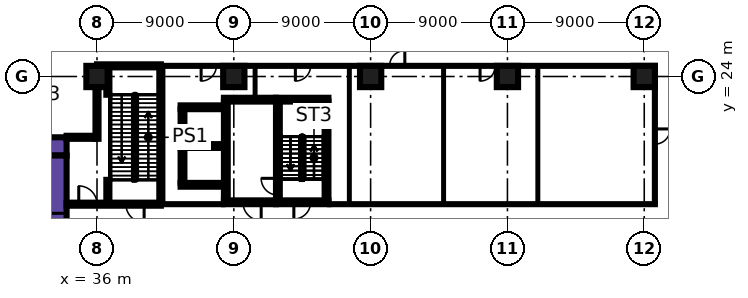
"""IFC4 building model, lengths in metres.
Left out: names, types, materials, properties, quantities, classifications, styles, units other than length and angle.
Written with IfcOpenShell. Run it as: python <this file> out.ifc"""

import sys

from ifc_helpers import new_model, si_unit, direction, frame, frame_2d, origin, origin_2d, place, context, subcontext, project, spatial, rectangle, extrude, element, fill, save


model = new_model("IFC4")
c1 = context("Model", 3, precision=1e-05, world=origin(), true_north=direction((0.0, 1.0)))
c2 = subcontext(c1, "Body", "Model", "MODEL_VIEW")
j1 = project(units=[si_unit("LENGTHUNIT", "METRE"), si_unit("PLANEANGLEUNIT", "RADIAN")], contexts=[c1])
p1 = place(None, origin())
s1 = spatial("IfcSite", under=j1, at=p1, CompositionType="ELEMENT")
p2 = place(p1, origin())
s2 = spatial("IfcBuilding", under=s1, at=p2, CompositionType="ELEMENT")
p3 = place(p2, origin())
s3 = spatial("IfcBuildingStorey", under=s2, at=p3, CompositionType="ELEMENT", Elevation=0.0)
for number, where, z_axis, x_axis in (
    (1, (36.0, 24.0, 0.0), (0.0, 0.0, 1.0), (1.0, 0.0, 0.0)),
    (2, (45.0, 24.0, 0.0), (0.0, 0.0, 1.0), (1.0, 0.0, 0.0)),
    (3, (54.0, 24.0, 0.0), (0.0, 0.0, 1.0), (1.0, 0.0, 0.0)),
    (4, (63.0, 24.0, 0.0), (0.0, 0.0, 1.0), (1.0, 0.0, 0.0)),
    (5, (72.0, 24.0, 0.0), (0.0, 0.0, 1.0), (1.0, 0.0, 0.0)),
):
    element("IfcColumn", number, at=place(p3, frame(where, z_axis=z_axis, x_axis=x_axis)), inside=s3, PredefinedType="COLUMN", context=c2, shape_type="SweptSolid", body=[
        extrude(rectangle(XDim=1.4, YDim=1.4, at=origin_2d()), origin(), (0.0, 0.0, 1.0), 7.2),
    ])
p4 = place(p3, frame((9.0, 19.4, 0.0), z_axis=(0.0, 0.0, 1.0), x_axis=(1.0, 0.0, 0.0)))
e6 = element("IfcWall", 6, at=p4, inside=s3, PredefinedType="SHEAR", context=c2, shape_type="SweptSolid", body=[
    extrude(rectangle(XDim=25.0, YDim=1.2, at=frame_2d((12.5, 0.0))), origin(), (0.0, 0.0, 1.0), 7.2),
])
p5 = place(p4, frame((19.1, 0.0, 0.0)))
e7 = element("IfcOpeningElement", 7, at=p5, cuts=e6, PredefinedType="OPENING", context=c2, shape_type="SweptSolid", body=[
    extrude(rectangle(XDim=1.8, YDim=2.4, at=frame_2d((0.9, 1.2))), frame((0.0, 0.61, 0.0), z_axis=(0.0, -1.0, 0.0), x_axis=(1.0, 0.0, 0.0)), (0.0, 0.0, 1.0), 1.22),
])
p6 = place(p3, frame((33.4, 8.2, 0.0), z_axis=(0.0, 0.0, 1.0), x_axis=(0.0, 1.0, 0.0)))
e8 = element("IfcWall", 8, at=p6, inside=s3, PredefinedType="SHEAR", context=c2, shape_type="SweptSolid", body=[
    extrude(rectangle(XDim=10.6, YDim=1.2, at=frame_2d((5.3, 0.0))), origin(), (0.0, 0.0, 1.0), 7.2),
])
p7 = place(p6, frame((5.0, 0.0, 0.0)))
e9 = element("IfcOpeningElement", 9, at=p7, cuts=e8, PredefinedType="OPENING", context=c2, shape_type="SweptSolid", body=[
    extrude(rectangle(XDim=1.8, YDim=2.4, at=frame_2d((0.9, 1.2))), frame((0.0, 0.61, 0.0), z_axis=(0.0, -1.0, 0.0), x_axis=(1.0, 0.0, 0.0)), (0.0, 0.0, 1.0), 1.22),
])
p8 = place(p3, frame((47.775, 15.725, 0.0), z_axis=(0.0, 0.0, 1.0), x_axis=(1.0, 0.0, 0.0)))
e10 = element("IfcWall", 10, at=p8, inside=s3, PredefinedType="SHEAR", context=c2, shape_type="SweptSolid", body=[
    extrude(rectangle(XDim=3.45, YDim=0.25, at=frame_2d((1.725, 0.0))), origin(), (0.0, 0.0, 1.0), 7.2),
])
p9 = place(p8, frame((1.175, 0.0, 0.0)))
e11 = element("IfcOpeningElement", 11, at=p9, cuts=e10, PredefinedType="OPENING", context=c2, shape_type="SweptSolid", body=[
    extrude(rectangle(XDim=1.1, YDim=2.2, at=frame_2d((0.55, 1.1))), frame((0.0, 0.135, 0.0), z_axis=(0.0, -1.0, 0.0), x_axis=(1.0, 0.0, 0.0)), (0.0, 0.0, 1.0), 0.27),
])
p10 = place(p3, frame((47.775, 22.475, 0.0), z_axis=(0.0, 0.0, 1.0), x_axis=(1.0, 0.0, 0.0)))
e12 = element("IfcWall", 12, at=p10, inside=s3, PredefinedType="SHEAR", context=c2, shape_type="SweptSolid", body=[
    extrude(rectangle(XDim=3.45, YDim=0.25, at=frame_2d((1.725, 0.0))), origin(), (0.0, 0.0, 1.0), 7.2),
])
p11 = place(p3, frame((47.9, 15.85, 0.0), z_axis=(0.0, 0.0, 1.0), x_axis=(0.0, 1.0, 0.0)))
e13 = element("IfcWall", 13, at=p11, inside=s3, PredefinedType="SHEAR", context=c2, shape_type="SweptSolid", body=[
    extrude(rectangle(XDim=6.5, YDim=0.25, at=frame_2d((3.25, 0.0))), origin(), (0.0, 0.0, 1.0), 7.2),
])
p12 = place(p11, frame((0.35, 0.0, 0.0)))
e14 = element("IfcOpeningElement", 14, at=p12, cuts=e13, PredefinedType="OPENING", context=c2, shape_type="SweptSolid", body=[
    extrude(rectangle(XDim=1.1, YDim=2.2, at=frame_2d((0.55, 1.1))), frame((0.0, 0.135, 0.0), z_axis=(0.0, -1.0, 0.0), x_axis=(1.0, 0.0, 0.0)), (0.0, 0.0, 1.0), 0.27),
])
p13 = place(p3, frame((51.1, 15.85, 0.0), z_axis=(0.0, 0.0, 1.0), x_axis=(0.0, 1.0, 0.0)))
e15 = element("IfcWall", 15, at=p13, inside=s3, PredefinedType="SHEAR", context=c2, shape_type="SweptSolid", body=[
    extrude(rectangle(XDim=6.5, YDim=0.25, at=frame_2d((3.25, 0.0))), origin(), (0.0, 0.0, 1.0), 7.2),
])
p14 = place(p3, frame((44.35, 15.725, 0.0), z_axis=(0.0, 0.0, 1.0), x_axis=(1.0, 0.0, 0.0)))
e16 = element("IfcWall", 16, at=p14, inside=s3, PredefinedType="SHEAR", context=c2, shape_type="SweptSolid", body=[
    extrude(rectangle(XDim=3.425, YDim=0.25, at=frame_2d((1.712, 0.0))), origin(), (0.0, 0.0, 1.0), 7.2),
])
p15 = place(p14, frame((1.25, 0.0, 0.0)))
e17 = element("IfcOpeningElement", 17, at=p15, cuts=e16, PredefinedType="OPENING", context=c2, shape_type="SweptSolid", body=[
    extrude(rectangle(XDim=1.2, YDim=2.2, at=frame_2d((0.6, 1.1))), frame((0.0, 0.135, 0.0), z_axis=(0.0, -1.0, 0.0), x_axis=(1.0, 0.0, 0.0)), (0.0, 0.0, 1.0), 0.27),
])
p16 = place(p3, frame((44.35, 22.475, 0.0), z_axis=(0.0, 0.0, 1.0), x_axis=(1.0, 0.0, 0.0)))
e18 = element("IfcWall", 18, at=p16, inside=s3, PredefinedType="SHEAR", context=c2, shape_type="SweptSolid", body=[
    extrude(rectangle(XDim=3.425, YDim=0.25, at=frame_2d((1.712, 0.0))), origin(), (0.0, 0.0, 1.0), 7.2),
])
p17 = place(p3, frame((44.475, 15.85, 0.0), z_axis=(0.0, 0.0, 1.0), x_axis=(0.0, 1.0, 0.0)))
e19 = element("IfcWall", 19, at=p17, inside=s3, PredefinedType="SHEAR", context=c2, shape_type="SweptSolid", body=[
    extrude(rectangle(XDim=6.5, YDim=0.25, at=frame_2d((3.25, 0.0))), origin(), (0.0, 0.0, 1.0), 7.2),
])
p18 = place(p17, frame((1.75, 0.0, 0.0)))
e20 = element("IfcOpeningElement", 20, at=p18, cuts=e19, PredefinedType="OPENING", context=c2, shape_type="SweptSolid", body=[
    extrude(rectangle(XDim=1.1, YDim=2.2, at=frame_2d((0.55, 1.1))), frame((0.0, 0.135, 0.0), z_axis=(0.0, -1.0, 0.0), x_axis=(1.0, 0.0, 0.0)), (0.0, 0.0, 1.0), 0.27),
])
p19 = place(p17, frame((4.3, 0.0, 0.0)))
e21 = element("IfcOpeningElement", 21, at=p19, cuts=e19, PredefinedType="OPENING", context=c2, shape_type="SweptSolid", body=[
    extrude(rectangle(XDim=1.1, YDim=2.2, at=frame_2d((0.55, 1.1))), frame((0.0, 0.135, 0.0), z_axis=(0.0, -1.0, 0.0), x_axis=(1.0, 0.0, 0.0)), (0.0, 0.0, 1.0), 0.27),
])
for number, where, z_axis, x_axis in (
    (22, (41.5, 16.875, 0.0), (0.0, 0.0, 1.0), (1.0, 0.0, 0.0)),
    (23, (41.5, 19.425, 0.0), (0.0, 0.0, 1.0), (1.0, 0.0, 0.0)),
    (24, (41.5, 21.975, 0.0), (0.0, 0.0, 1.0), (1.0, 0.0, 0.0)),
):
    element("IfcWall", number, at=place(p3, frame(where, z_axis=z_axis, x_axis=x_axis)), inside=s3, PredefinedType="SHEAR", context=c2, shape_type="SweptSolid", body=[
        extrude(rectangle(XDim=2.85, YDim=0.25, at=frame_2d((1.425, 0.0))), origin(), (0.0, 0.0, 1.0), 7.2),
    ])
for number, where, z_axis, x_axis in (
    (25, (41.625, 17.0, 0.0), (0.0, 0.0, 1.0), (0.0, 1.0, 0.0)),
    (26, (41.625, 19.55, 0.0), (0.0, 0.0, 1.0), (0.0, 1.0, 0.0)),
):
    element("IfcWall", number, at=place(p3, frame(where, z_axis=z_axis, x_axis=x_axis)), inside=s3, PredefinedType="SHEAR", context=c2, shape_type="SweptSolid", body=[
        extrude(rectangle(XDim=2.3, YDim=0.25, at=frame_2d((1.15, 0.0))), origin(), (0.0, 0.0, 1.0), 7.2),
    ])
p20 = place(p3, frame((34.0, 15.6, 0.0), z_axis=(0.0, 0.0, 1.0), x_axis=(1.0, 0.0, 0.0)))
e27 = element("IfcWall", 27, at=p20, inside=s3, PredefinedType="SOLIDWALL", context=c2, shape_type="SweptSolid", body=[
    extrude(rectangle(XDim=6.2, YDim=0.2, at=frame_2d((3.1, 0.0))), origin(), (0.0, 0.0, 1.0), 6.8),
])
p21 = place(p20, frame((3.9, 0.0, 0.0)))
e28 = element("IfcOpeningElement", 28, at=p21, cuts=e27, PredefinedType="OPENING", context=c2, shape_type="SweptSolid", body=[
    extrude(rectangle(XDim=1.2, YDim=2.1, at=frame_2d((0.6, 1.05))), frame((0.0, 0.11, 0.0), z_axis=(0.0, -1.0, 0.0), x_axis=(1.0, 0.0, 0.0)), (0.0, 0.0, 1.0), 0.22),
])
p22 = place(p20, frame((0.8, 0.0, 0.0)))
e29 = element("IfcOpeningElement", 29, at=p22, cuts=e27, PredefinedType="OPENING", context=c2, shape_type="SweptSolid", body=[
    extrude(rectangle(XDim=1.2, YDim=2.1, at=frame_2d((0.6, 1.05))), frame((0.0, 0.11, 0.0), z_axis=(0.0, -1.0, 0.0), x_axis=(1.0, 0.0, 0.0)), (0.0, 0.0, 1.0), 0.22),
])
p23 = place(p3, frame((34.0, 20.0, 0.0), z_axis=(0.0, 0.0, 1.0), x_axis=(1.0, 0.0, 0.0)))
e30 = element("IfcWall", 30, at=p23, inside=s3, PredefinedType="SOLIDWALL", context=c2, shape_type="SweptSolid", body=[
    extrude(rectangle(XDim=1.9, YDim=0.2, at=frame_2d((0.95, 0.0))), origin(), (0.0, 0.0, 1.0), 6.8),
])
p24 = place(p3, frame((36.0, 19.9, 0.0), z_axis=(0.0, 0.0, 1.0), x_axis=(0.0, 1.0, 0.0)))
e31 = element("IfcWall", 31, at=p24, inside=s3, PredefinedType="SOLIDWALL", context=c2, shape_type="SweptSolid", body=[
    extrude(rectangle(XDim=4.1, YDim=0.2, at=frame_2d((2.05, 0.0))), origin(), (0.0, 0.0, 1.0), 6.8),
])
p25 = place(p3, frame((36.0, 24.7, 0.0), z_axis=(0.0, 0.0, 1.0), x_axis=(1.0, 0.0, 0.0)))
e32 = element("IfcWall", 32, at=p25, inside=s3, PredefinedType="SOLIDWALL", context=c2, shape_type="SweptSolid", body=[
    extrude(rectangle(XDim=4.2, YDim=0.2, at=frame_2d((2.1, 0.0))), origin(), (0.0, 0.0, 1.0), 6.8),
])
p26 = place(p3, frame((40.2, 15.6, 0.0), z_axis=(0.0, 0.0, 1.0), x_axis=(1.0, 0.0, 0.0)))
e33 = element("IfcWall", 33, at=p26, inside=s3, PredefinedType="PARTITIONING", context=c2, shape_type="SweptSolid", body=[
    extrude(rectangle(XDim=4.15, YDim=0.2, at=frame_2d((2.075, 0.0))), origin(), (0.0, 0.0, 1.0), 6.8),
])
p27 = place(p3, frame((40.2, 15.7, 0.0), z_axis=(0.0, 0.0, 1.0), x_axis=(0.0, 1.0, 0.0)))
e34 = element("IfcWall", 34, at=p27, inside=s3, PredefinedType="SOLIDWALL", context=c2, shape_type="SweptSolid", body=[
    extrude(rectangle(XDim=8.9, YDim=0.2, at=frame_2d((4.45, 0.0))), origin(), (0.0, 0.0, 1.0), 6.8),
])
p28 = place(p3, frame((40.2, 24.7, 0.0), z_axis=(0.0, 0.0, 1.0), x_axis=(1.0, 0.0, 0.0)))
e35 = element("IfcWall", 35, at=p28, inside=s3, PredefinedType="PARTITIONING", context=c2, shape_type="SweptSolid", body=[
    extrude(rectangle(XDim=32.6, YDim=0.2, at=frame_2d((16.3, 0.0))), origin(), (0.0, 0.0, 1.0), 6.8),
])
p29 = place(p28, frame((2.65, 0.0, 0.0)))
e36 = element("IfcOpeningElement", 36, at=p29, cuts=e35, PredefinedType="OPENING", context=c2, shape_type="SweptSolid", body=[
    extrude(rectangle(XDim=1.0, YDim=2.1, at=frame_2d((0.5, 1.05))), frame((0.0, 0.11, 0.0), z_axis=(0.0, -1.0, 0.0), x_axis=(1.0, 0.0, 0.0)), (0.0, 0.0, 1.0), 0.22),
])
p30 = place(p28, frame((8.85, 0.0, 0.0)))
e37 = element("IfcOpeningElement", 37, at=p30, cuts=e35, PredefinedType="OPENING", context=c2, shape_type="SweptSolid", body=[
    extrude(rectangle(XDim=1.0, YDim=2.1, at=frame_2d((0.5, 1.05))), frame((0.0, 0.11, 0.0), z_axis=(0.0, -1.0, 0.0), x_axis=(1.0, 0.0, 0.0)), (0.0, 0.0, 1.0), 0.22),
])
p31 = place(p28, frame((15.05, 0.0, 0.0)))
e38 = element("IfcOpeningElement", 38, at=p31, cuts=e35, PredefinedType="OPENING", context=c2, shape_type="SweptSolid", body=[
    extrude(rectangle(XDim=1.0, YDim=2.1, at=frame_2d((0.5, 1.05))), frame((0.0, 0.11, 0.0), z_axis=(0.0, -1.0, 0.0), x_axis=(1.0, 0.0, 0.0)), (0.0, 0.0, 1.0), 0.22),
])
p32 = place(p28, frame((21.0, 0.0, 0.0)))
e39 = element("IfcOpeningElement", 39, at=p32, cuts=e35, PredefinedType="OPENING", context=c2, shape_type="SweptSolid", body=[
    extrude(rectangle(XDim=1.0, YDim=2.1, at=frame_2d((0.5, 1.05))), frame((0.0, 0.11, 0.0), z_axis=(0.0, -1.0, 0.0), x_axis=(1.0, 0.0, 0.0)), (0.0, 0.0, 1.0), 0.22),
])
p33 = place(p3, frame((46.4, 22.6, 0.0), z_axis=(0.0, 0.0, 1.0), x_axis=(0.0, 1.0, 0.0)))
e40 = element("IfcWall", 40, at=p33, inside=s3, PredefinedType="PARTITIONING", context=c2, shape_type="SweptSolid", body=[
    extrude(rectangle(XDim=2.0, YDim=0.125, at=frame_2d((1.0, 0.0))), origin(), (0.0, 0.0, 1.0), 6.8),
])
p34 = place(p3, frame((51.225, 15.6, 0.0), z_axis=(0.0, 0.0, 1.0), x_axis=(1.0, 0.0, 0.0)))
e41 = element("IfcWall", 41, at=p34, inside=s3, PredefinedType="PARTITIONING", context=c2, shape_type="SweptSolid", body=[
    extrude(rectangle(XDim=21.575, YDim=0.2, at=frame_2d((10.788, 0.0))), origin(), (0.0, 0.0, 1.0), 6.8),
])
for number, where, z_axis, x_axis in (
    (42, (52.6, 15.7, 0.0), (0.0, 0.0, 1.0), (0.0, 1.0, 0.0)),
    (43, (58.8, 15.7, 0.0), (0.0, 0.0, 1.0), (0.0, 1.0, 0.0)),
    (44, (65.0, 15.7, 0.0), (0.0, 0.0, 1.0), (0.0, 1.0, 0.0)),
):
    element("IfcWall", number, at=place(p3, frame(where, z_axis=z_axis, x_axis=x_axis)), inside=s3, PredefinedType="PARTITIONING", context=c2, shape_type="SweptSolid", body=[
        extrude(rectangle(XDim=8.9, YDim=0.125, at=frame_2d((4.45, 0.0))), origin(), (0.0, 0.0, 1.0), 6.8),
    ])
p35 = place(p3, frame((72.7, 15.7, 0.0), z_axis=(0.0, 0.0, 1.0), x_axis=(0.0, 1.0, 0.0)))
e45 = element("IfcWall", 45, at=p35, inside=s3, PredefinedType="PARTITIONING", context=c2, shape_type="SweptSolid", body=[
    extrude(rectangle(XDim=8.9, YDim=0.2, at=frame_2d((4.45, 0.0))), origin(), (0.0, 0.0, 1.0), 6.8),
])
p36 = place(p35, frame((3.85, 0.0, 0.0)))
e46 = element("IfcOpeningElement", 46, at=p36, cuts=e45, PredefinedType="OPENING", context=c2, shape_type="SweptSolid", body=[
    extrude(rectangle(XDim=1.0, YDim=2.1, at=frame_2d((0.5, 1.05))), frame((0.0, 0.11, 0.0), z_axis=(0.0, -1.0, 0.0), x_axis=(1.0, 0.0, 0.0)), (0.0, 0.0, 1.0), 0.22),
])
p37 = place(p3, frame((36.715, 22.8, 0.0), z_axis=(0.0, 0.0, 1.0), x_axis=(0.0, 1.0, 0.0)))
e47 = element("IfcWall", 47, at=p37, inside=s3, PredefinedType="SOLIDWALL", context=c2, shape_type="SweptSolid", body=[
    extrude(rectangle(XDim=1.8, YDim=0.2, at=frame_2d((0.9, 0.0))), origin(), (0.0, 0.0, 1.0), 6.8),
])
p38 = place(p3, frame((36.715, 15.7, 0.0), z_axis=(0.0, 0.0, 1.0), x_axis=(0.0, 1.0, 0.0)))
e48 = element("IfcWall", 48, at=p38, inside=s3, PredefinedType="SOLIDWALL", context=c2, shape_type="SweptSolid", body=[
    extrude(rectangle(XDim=1.5, YDim=0.2, at=frame_2d((0.75, 0.0))), origin(), (0.0, 0.0, 1.0), 6.8),
])
p39 = place(p7, origin())
e49 = element("IfcDoor", 49, at=p39, inside=s3, OperationType="DOUBLE_DOOR_SINGLE_SWING", PredefinedType="DOOR", context=c2, shape_type="SweptSolid", body=[
    extrude(rectangle(XDim=1.8, YDim=2.4, at=frame_2d((0.9, 1.2))), frame((0.0, 0.025, 0.0), z_axis=(0.0, -1.0, 0.0), x_axis=(1.0, 0.0, 0.0)), (0.0, 0.0, 1.0), 0.05),
])
fill(e9, e49)
p40 = place(p9, frame((1.1, 0.0, 0.0), z_axis=(0.0, 0.0, 1.0), x_axis=(-1.0, 0.0, 0.0)))
e50 = element("IfcDoor", 50, at=p40, inside=s3, OperationType="SINGLE_SWING_LEFT", PredefinedType="DOOR", context=c2, shape_type="SweptSolid", body=[
    extrude(rectangle(XDim=1.1, YDim=2.2, at=frame_2d((0.55, 1.1))), frame((0.0, 0.025, 0.0), z_axis=(0.0, -1.0, 0.0), x_axis=(1.0, 0.0, 0.0)), (0.0, 0.0, 1.0), 0.05),
])
fill(e11, e50)
p41 = place(p15, origin())
e51 = element("IfcDoor", 51, at=p41, inside=s3, OperationType="SINGLE_SWING_RIGHT", PredefinedType="DOOR", context=c2, shape_type="SweptSolid", body=[
    extrude(rectangle(XDim=1.2, YDim=2.2, at=frame_2d((0.6, 1.1))), frame((0.0, 0.025, 0.0), z_axis=(0.0, -1.0, 0.0), x_axis=(1.0, 0.0, 0.0)), (0.0, 0.0, 1.0), 0.05),
])
fill(e17, e51)
p42 = place(p12, frame((1.1, 0.0, 0.0), z_axis=(0.0, 0.0, 1.0), x_axis=(-1.0, 0.0, 0.0)))
e52 = element("IfcDoor", 52, at=p42, inside=s3, OperationType="SINGLE_SWING_RIGHT", PredefinedType="DOOR", context=c2, shape_type="SweptSolid", body=[
    extrude(rectangle(XDim=1.1, YDim=2.2, at=frame_2d((0.55, 1.1))), frame((0.0, 0.025, 0.0), z_axis=(0.0, -1.0, 0.0), x_axis=(1.0, 0.0, 0.0)), (0.0, 0.0, 1.0), 0.05),
])
fill(e14, e52)
p43 = place(p18, origin())
e53 = element("IfcDoor", 53, at=p43, inside=s3, OperationType="DOUBLE_DOOR_SLIDING", PredefinedType="DOOR", context=c2, shape_type="SweptSolid", body=[
    extrude(rectangle(XDim=1.1, YDim=2.2, at=frame_2d((0.55, 1.1))), frame((0.0, 0.025, 0.0), z_axis=(0.0, -1.0, 0.0), x_axis=(1.0, 0.0, 0.0)), (0.0, 0.0, 1.0), 0.05),
])
fill(e20, e53)
p44 = place(p19, origin())
e54 = element("IfcDoor", 54, at=p44, inside=s3, OperationType="DOUBLE_DOOR_SLIDING", PredefinedType="DOOR", context=c2, shape_type="SweptSolid", body=[
    extrude(rectangle(XDim=1.1, YDim=2.2, at=frame_2d((0.55, 1.1))), frame((0.0, 0.025, 0.0), z_axis=(0.0, -1.0, 0.0), x_axis=(1.0, 0.0, 0.0)), (0.0, 0.0, 1.0), 0.05),
])
fill(e21, e54)
p45 = place(p29, frame((1.0, 0.0, 0.0), z_axis=(0.0, 0.0, 1.0), x_axis=(-1.0, 0.0, 0.0)))
e55 = element("IfcDoor", 55, at=p45, inside=s3, OperationType="SINGLE_SWING_LEFT", PredefinedType="DOOR", context=c2, shape_type="SweptSolid", body=[
    extrude(rectangle(XDim=1.0, YDim=2.1, at=frame_2d((0.5, 1.05))), frame((0.0, 0.025, 0.0), z_axis=(0.0, -1.0, 0.0), x_axis=(1.0, 0.0, 0.0)), (0.0, 0.0, 1.0), 0.05),
])
fill(e36, e55)
p46 = place(p30, frame((1.0, 0.0, 0.0), z_axis=(0.0, 0.0, 1.0), x_axis=(-1.0, 0.0, 0.0)))
e56 = element("IfcDoor", 56, at=p46, inside=s3, OperationType="SINGLE_SWING_LEFT", PredefinedType="DOOR", context=c2, shape_type="SweptSolid", body=[
    extrude(rectangle(XDim=1.0, YDim=2.1, at=frame_2d((0.5, 1.05))), frame((0.0, 0.025, 0.0), z_axis=(0.0, -1.0, 0.0), x_axis=(1.0, 0.0, 0.0)), (0.0, 0.0, 1.0), 0.05),
])
fill(e37, e56)
p47 = place(p31, frame((1.0, 0.0, 0.0), z_axis=(0.0, 0.0, 1.0), x_axis=(-1.0, 0.0, 0.0)))
e57 = element("IfcDoor", 57, at=p47, inside=s3, OperationType="SINGLE_SWING_RIGHT", PredefinedType="DOOR", context=c2, shape_type="SweptSolid", body=[
    extrude(rectangle(XDim=1.0, YDim=2.1, at=frame_2d((0.5, 1.05))), frame((0.0, 0.025, 0.0), z_axis=(0.0, -1.0, 0.0), x_axis=(1.0, 0.0, 0.0)), (0.0, 0.0, 1.0), 0.05),
])
fill(e38, e57)
p48 = place(p32, frame((1.0, 0.0, 0.0), z_axis=(0.0, 0.0, 1.0), x_axis=(-1.0, 0.0, 0.0)))
e58 = element("IfcDoor", 58, at=p48, inside=s3, OperationType="SINGLE_SWING_LEFT", PredefinedType="DOOR", context=c2, shape_type="SweptSolid", body=[
    extrude(rectangle(XDim=1.0, YDim=2.1, at=frame_2d((0.5, 1.05))), frame((0.0, 0.025, 0.0), z_axis=(0.0, -1.0, 0.0), x_axis=(1.0, 0.0, 0.0)), (0.0, 0.0, 1.0), 0.05),
])
fill(e39, e58)
p49 = place(p36, origin())
e59 = element("IfcDoor", 59, at=p49, inside=s3, OperationType="SINGLE_SWING_RIGHT", PredefinedType="DOOR", context=c2, shape_type="SweptSolid", body=[
    extrude(rectangle(XDim=1.0, YDim=2.1, at=frame_2d((0.5, 1.05))), frame((0.0, 0.025, 0.0), z_axis=(0.0, -1.0, 0.0), x_axis=(1.0, 0.0, 0.0)), (0.0, 0.0, 1.0), 0.05),
])
fill(e46, e59)
p50 = place(p21, origin())
e60 = element("IfcDoor", 60, at=p50, inside=s3, OperationType="SINGLE_SWING_RIGHT", PredefinedType="DOOR", context=c2, shape_type="SweptSolid", body=[
    extrude(rectangle(XDim=1.2, YDim=2.1, at=frame_2d((0.6, 1.05))), frame((0.0, 0.025, 0.0), z_axis=(0.0, -1.0, 0.0), x_axis=(1.0, 0.0, 0.0)), (0.0, 0.0, 1.0), 0.05),
])
fill(e28, e60)
p51 = place(p22, origin())
e61 = element("IfcDoor", 61, at=p51, inside=s3, OperationType="SINGLE_SWING_LEFT", PredefinedType="DOOR", context=c2, shape_type="SweptSolid", body=[
    extrude(rectangle(XDim=1.2, YDim=2.1, at=frame_2d((0.6, 1.05))), frame((0.0, 0.025, 0.0), z_axis=(0.0, -1.0, 0.0), x_axis=(1.0, 0.0, 0.0)), (0.0, 0.0, 1.0), 0.05),
])
fill(e29, e61)
save(model, sys.argv[1])
